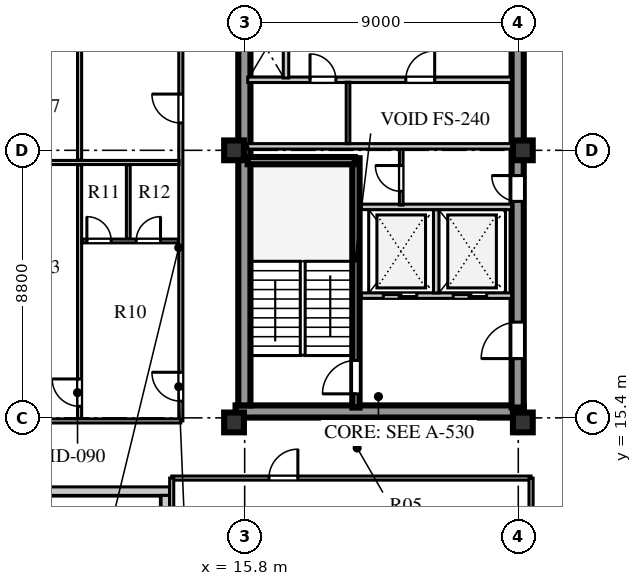
"""IFC4 building model, lengths in metres.
Left out: names, types, materials, properties, quantities, classifications, styles, units other than length and angle.
Written with IfcOpenShell. Run it as: python <this file> out.ifc"""

import sys

from ifc_helpers import new_model, si_unit, direction, frame, frame_2d, origin, origin_2d, place, context, subcontext, project, spatial, rectangle, extrude, element, fill, save


model = new_model("IFC4")
c1 = context("Model", 3, precision=1e-05, world=origin(), true_north=direction((0.0, 1.0)))
c2 = subcontext(c1, "Body", "Model", "MODEL_VIEW")
j1 = project(units=[si_unit("LENGTHUNIT", "METRE"), si_unit("PLANEANGLEUNIT", "RADIAN")], contexts=[c1])
p1 = place(None, origin())
s1 = spatial("IfcSite", under=j1, at=p1, CompositionType="ELEMENT")
p2 = place(p1, origin())
s2 = spatial("IfcBuilding", under=s1, at=p2, CompositionType="ELEMENT")
p3 = place(p2, frame((0.0, 0.0, 229.7)))
s3 = spatial("IfcBuildingStorey", under=s2, at=p3, CompositionType="ELEMENT", Elevation=229.7)
p4 = place(p3, frame((15.5, 15.61, 0.0), z_axis=(0.0, 0.0, 1.0), x_axis=(1.0, 0.0, 0.0)))
e1 = element("IfcWall", 1, at=p4, inside=s3, PredefinedType="SHEAR", context=c2, shape_type="SweptSolid", body=[
    extrude(rectangle(XDim=9.48, YDim=0.4, at=frame_2d((4.74, 0.0))), origin(), (0.0, 0.0, 1.0), 3.66),
])
p5 = place(p3, frame((15.79, 15.81, 0.0), z_axis=(0.0, 0.0, 1.0), x_axis=(0.0, 1.0, 0.0)))
e2 = element("IfcWall", 2, at=p5, inside=s3, PredefinedType="SHEAR", context=c2, shape_type="SweptSolid", body=[
    extrude(rectangle(XDim=25.63, YDim=0.4, at=frame_2d((12.815, 0.0))), origin(), (0.0, 0.0, 1.0), 3.66),
])
p6 = place(p3, frame((24.78, 15.74, 0.0), z_axis=(0.0, 0.0, 1.0), x_axis=(0.0, 1.0, 0.0)))
e3 = element("IfcWall", 3, at=p6, inside=s3, PredefinedType="SHEAR", context=c2, shape_type="SweptSolid", body=[
    extrude(rectangle(XDim=25.76, YDim=0.4, at=frame_2d((12.88, 0.0))), origin(), (0.0, 0.0, 1.0), 3.66),
])
p7 = place(p6, frame((1.61, 0.0, 0.0)))
e4 = element("IfcOpeningElement", 4, at=p7, cuts=e3, PredefinedType="OPENING", context=c2, shape_type="SweptSolid", body=[
    extrude(rectangle(XDim=1.2, YDim=2.1, at=frame_2d((0.6, 1.05))), frame((0.0, 0.21, 0.0), z_axis=(0.0, -1.0, 0.0), x_axis=(1.0, 0.0, 0.0)), (0.0, 0.0, 1.0), 0.42),
])
p8 = place(p6, frame((6.78, 0.0, 0.0)))
e5 = element("IfcOpeningElement", 5, at=p8, cuts=e3, PredefinedType="OPENING", context=c2, shape_type="SweptSolid", body=[
    extrude(rectangle(XDim=0.85, YDim=2.06, at=frame_2d((0.425, 1.03))), frame((0.0, 0.21, 0.0), z_axis=(0.0, -1.0, 0.0), x_axis=(1.0, 0.0, 0.0)), (0.0, 0.0, 1.0), 0.42),
])
p9 = place(p6, frame((12.11, 0.0, 0.0)))
e6 = element("IfcOpeningElement", 6, at=p9, cuts=e3, PredefinedType="OPENING", context=c2, shape_type="SweptSolid", body=[
    extrude(rectangle(XDim=1.5, YDim=2.12, at=frame_2d((0.75, 1.06))), frame((0.0, 0.21, 0.0), z_axis=(0.0, -1.0, 0.0), x_axis=(1.0, 0.0, 0.0)), (0.0, 0.0, 1.0), 0.42),
])
p10 = place(p6, frame((20.11, 0.0, 0.0)))
e7 = element("IfcOpeningElement", 7, at=p10, cuts=e3, PredefinedType="OPENING", context=c2, shape_type="SweptSolid", body=[
    extrude(rectangle(XDim=1.2, YDim=2.12, at=frame_2d((0.6, 1.06))), frame((0.0, 0.21, 0.0), z_axis=(0.0, -1.0, 0.0), x_axis=(1.0, 0.0, 0.0)), (0.0, 0.0, 1.0), 0.42),
])
p11 = place(p6, frame((24.01, 0.0, 0.0)))
e8 = element("IfcOpeningElement", 8, at=p11, cuts=e3, PredefinedType="OPENING", context=c2, shape_type="SweptSolid", body=[
    extrude(rectangle(XDim=0.95, YDim=2.1, at=frame_2d((0.475, 1.05))), frame((0.0, 0.21, 0.0), z_axis=(0.0, -1.0, 0.0), x_axis=(1.0, 0.0, 0.0)), (0.0, 0.0, 1.0), 0.42),
])
for number, where, z_axis, x_axis in (
    (9, (15.45, 15.25, 0.0), (0.0, 0.0, 1.0), (1.0, 0.0, 0.0)),
    (10, (15.45, 24.2, 0.0), (0.0, 0.0, 1.0), (1.0, 0.0, 0.0)),
    (11, (24.95, 15.25, 0.0), (0.0, 0.0, 1.0), (1.0, 0.0, 0.0)),
    (12, (24.95, 24.2, 0.0), (0.0, 0.0, 1.0), (1.0, 0.0, 0.0)),
):
    element("IfcColumn", number, at=place(p3, frame(where, z_axis=z_axis, x_axis=x_axis)), inside=s3, PredefinedType="COLUMN", context=c2, shape_type="SweptSolid", body=[
        extrude(rectangle(XDim=0.65, YDim=0.65, at=origin_2d()), origin(), (0.0, 0.0, 1.0), 3.66),
    ])
p12 = place(p3, frame((7.8, 12.99, 0.0), z_axis=(0.0, 0.0, 1.0), x_axis=(1.0, 0.0, 0.0)))
e13 = element("IfcWall", 13, at=p12, inside=s3, PredefinedType="STANDARD", context=c2, shape_type="SweptSolid", body=[
    extrude(rectangle(XDim=5.53, YDim=0.28, at=frame_2d((2.765, 0.0))), origin(), (0.0, 0.0, 1.0), 3.66),
])
p13 = place(p3, frame((13.19, 12.85, 0.0), z_axis=(0.0, 0.0, 1.0), x_axis=(0.0, -1.0, 0.0)))
e14 = element("IfcWall", 14, at=p13, inside=s3, PredefinedType="STANDARD", context=c2, shape_type="SweptSolid", body=[
    extrude(rectangle(XDim=4.97, YDim=0.28, at=frame_2d((2.485, 0.0))), origin(), (0.0, 0.0, 1.0), 3.66),
])
p14 = place(p3, frame((19.46, 15.74, 0.0), z_axis=(0.0, 0.0, 1.0), x_axis=(0.0, 1.0, 0.0)))
e15 = element("IfcWall", 15, at=p14, inside=s3, PredefinedType="SHEAR", context=c2, shape_type="SweptSolid", body=[
    extrude(rectangle(XDim=8.2, YDim=0.24, at=frame_2d((4.1, 0.0))), origin(), (0.0, 0.0, 1.0), 3.9),
])
p15 = place(p14, frame((0.45, 0.0, 0.0)))
e16 = element("IfcOpeningElement", 16, at=p15, cuts=e15, PredefinedType="OPENING", context=c2, shape_type="SweptSolid", body=[
    extrude(rectangle(XDim=1.1, YDim=2.1, at=frame_2d((0.55, 1.05))), frame((0.0, 0.13, 0.0), z_axis=(0.0, -1.0, 0.0), x_axis=(1.0, 0.0, 0.0)), (0.0, 0.0, 1.0), 0.26),
])
p16 = place(p3, frame((15.9, 23.86, 0.0), z_axis=(0.0, 0.0, 1.0), x_axis=(1.0, 0.0, 0.0)))
e17 = element("IfcWall", 17, at=p16, inside=s3, PredefinedType="SHEAR", context=c2, shape_type="SweptSolid", body=[
    extrude(rectangle(XDim=3.52, YDim=0.24, at=frame_2d((1.76, 0.0))), origin(), (0.0, 0.0, 1.0), 3.9),
])
p17 = place(p3, frame((19.64, 19.42, 0.0), z_axis=(0.0, 0.0, 1.0), x_axis=(1.0, 0.0, 0.0)))
e18 = element("IfcWall", 18, at=p17, inside=s3, PredefinedType="SOLIDWALL", context=c2, shape_type="SweptSolid", body=[
    extrude(rectangle(XDim=4.94, YDim=0.18, at=frame_2d((2.47, 0.0))), origin(), (0.0, 0.0, 1.0), 3.66),
])
p18 = place(p17, frame((0.72, 0.0, 0.0)))
e19 = element("IfcOpeningElement", 19, at=p18, cuts=e18, PredefinedType="OPENING", context=c2, shape_type="SweptSolid", body=[
    extrude(rectangle(XDim=1.1, YDim=2.1, at=frame_2d((0.55, 1.05))), frame((0.0, 0.1, 0.0), z_axis=(0.0, -1.0, 0.0), x_axis=(1.0, 0.0, 0.0)), (0.0, 0.0, 1.0), 0.2),
])
p19 = place(p17, frame((3.02, 0.0, 0.0)))
e20 = element("IfcOpeningElement", 20, at=p19, cuts=e18, PredefinedType="OPENING", context=c2, shape_type="SweptSolid", body=[
    extrude(rectangle(XDim=1.1, YDim=2.1, at=frame_2d((0.55, 1.05))), frame((0.0, 0.1, 0.0), z_axis=(0.0, -1.0, 0.0), x_axis=(1.0, 0.0, 0.0)), (0.0, 0.0, 1.0), 0.2),
])
p20 = place(p3, frame((22.1, 19.51, 0.0), z_axis=(0.0, 0.0, 1.0), x_axis=(0.0, 1.0, 0.0)))
e21 = element("IfcWall", 21, at=p20, inside=s3, PredefinedType="SOLIDWALL", context=c2, shape_type="SweptSolid", body=[
    extrude(rectangle(XDim=2.74, YDim=0.18, at=frame_2d((1.37, 0.0))), origin(), (0.0, 0.0, 1.0), 3.66),
])
p21 = place(p3, frame((19.64, 22.34, 0.0), z_axis=(0.0, 0.0, 1.0), x_axis=(1.0, 0.0, 0.0)))
e22 = element("IfcWall", 22, at=p21, inside=s3, PredefinedType="SOLIDWALL", context=c2, shape_type="SweptSolid", body=[
    extrude(rectangle(XDim=4.94, YDim=0.18, at=frame_2d((2.47, 0.0))), origin(), (0.0, 0.0, 1.0), 3.66),
])
p22 = place(p3, frame((20.95, 22.4, 0.0), z_axis=(0.0, 0.0, 1.0), x_axis=(0.0, 1.0, 0.0)))
e23 = element("IfcWall", 23, at=p22, inside=s3, PredefinedType="PARTITIONING", context=c2, shape_type="SweptSolid", body=[
    extrude(rectangle(XDim=1.88, YDim=0.12, at=frame_2d((0.94, 0.0))), origin(), (0.0, 0.0, 1.0), 3.66),
])
p23 = place(p22, frame((0.45, 0.0, 0.0)))
e24 = element("IfcOpeningElement", 24, at=p23, cuts=e23, PredefinedType="OPENING", context=c2, shape_type="SweptSolid", body=[
    extrude(rectangle(XDim=0.85, YDim=2.06, at=frame_2d((0.425, 1.03))), frame((0.0, 0.07, 0.0), z_axis=(0.0, -1.0, 0.0), x_axis=(1.0, 0.0, 0.0)), (0.0, 0.0, 1.0), 0.14),
])
p24 = place(p3, frame((15.9, 26.52, 0.0), z_axis=(0.0, 0.0, 1.0), x_axis=(1.0, 0.0, 0.0)))
e25 = element("IfcWall", 25, at=p24, inside=s3, PredefinedType="SOLIDWALL", context=c2, shape_type="SweptSolid", body=[
    extrude(rectangle(XDim=8.68, YDim=0.18, at=frame_2d((4.34, 0.0))), origin(), (0.0, 0.0, 1.0), 3.66),
])
p25 = place(p24, frame((2.05, 0.0, 0.0)))
e26 = element("IfcOpeningElement", 26, at=p25, cuts=e25, PredefinedType="OPENING", context=c2, shape_type="SweptSolid", body=[
    extrude(rectangle(XDim=0.85, YDim=2.06, at=frame_2d((0.425, 1.03))), frame((0.0, 0.1, 0.0), z_axis=(0.0, -1.0, 0.0), x_axis=(1.0, 0.0, 0.0)), (0.0, 0.0, 1.0), 0.2),
])
p26 = place(p24, frame((5.2, 0.0, 0.0)))
e27 = element("IfcOpeningElement", 27, at=p26, cuts=e25, PredefinedType="OPENING", context=c2, shape_type="SweptSolid", body=[
    extrude(rectangle(XDim=0.95, YDim=2.1, at=frame_2d((0.475, 1.05))), frame((0.0, 0.1, 0.0), z_axis=(0.0, -1.0, 0.0), x_axis=(1.0, 0.0, 0.0)), (0.0, 0.0, 1.0), 0.2),
])
p27 = place(p3, frame((15.9, 24.33, 0.0), z_axis=(0.0, 0.0, 1.0), x_axis=(1.0, 0.0, 0.0)))
e28 = element("IfcWall", 28, at=p27, inside=s3, PredefinedType="SOLIDWALL", context=c2, shape_type="SweptSolid", body=[
    extrude(rectangle(XDim=8.68, YDim=0.18, at=frame_2d((4.34, 0.0))), origin(), (0.0, 0.0, 1.0), 3.06),
])
p28 = place(p3, frame((19.2, 24.42, 0.0), z_axis=(0.0, 0.0, 1.0), x_axis=(0.0, 1.0, 0.0)))
e29 = element("IfcWall", 29, at=p28, inside=s3, PredefinedType="PARTITIONING", context=c2, shape_type="SweptSolid", body=[
    extrude(rectangle(XDim=2.02, YDim=0.12, at=frame_2d((1.01, 0.0))), origin(), (0.0, 0.0, 1.0), 3.66),
])
p29 = place(p3, frame((17.16, 26.58, 0.0), z_axis=(0.0, 0.0, 1.0), x_axis=(0.0, 1.0, 0.0)))
e30 = element("IfcWall", 30, at=p29, inside=s3, PredefinedType="SOLIDWALL", context=c2, shape_type="SweptSolid", body=[
    extrude(rectangle(XDim=4.02, YDim=0.18, at=frame_2d((2.01, 0.0))), origin(), (0.0, 0.0, 1.0), 3.66),
])
p30 = place(p29, frame((2.35, 0.0, 0.0)))
e31 = element("IfcOpeningElement", 31, at=p30, cuts=e30, PredefinedType="OPENING", context=c2, shape_type="SweptSolid", body=[
    extrude(rectangle(XDim=0.85, YDim=2.06, at=frame_2d((0.425, 1.03))), frame((0.0, 0.1, 0.0), z_axis=(0.0, -1.0, 0.0), x_axis=(1.0, 0.0, 0.0)), (0.0, 0.0, 1.0), 0.2),
])
p31 = place(p3, frame((13.4, 13.42, 0.0), z_axis=(0.0, 0.0, 1.0), x_axis=(1.0, 0.0, 0.0)))
e32 = element("IfcWall", 32, at=p31, inside=s3, PredefinedType="PARTITIONING", context=c2, shape_type="SweptSolid", body=[
    extrude(rectangle(XDim=11.82, YDim=0.135, at=frame_2d((5.91, 0.0))), origin(), (0.0, 0.0, 1.0), 3.66),
])
p32 = place(p31, frame((3.2, 0.0, 0.0)))
e33 = element("IfcOpeningElement", 33, at=p32, cuts=e32, PredefinedType="OPENING", context=c2, shape_type="SweptSolid", body=[
    extrude(rectangle(XDim=0.95, YDim=2.08, at=frame_2d((0.475, 1.04))), frame((0.0, 0.078, 0.0), z_axis=(0.0, -1.0, 0.0), x_axis=(1.0, 0.0, 0.0)), (0.0, 0.0, 1.0), 0.155),
])
p33 = place(p3, frame((13.4, 7.88, 0.0), z_axis=(0.0, 0.0, 1.0), x_axis=(0.0, 1.0, 0.0)))
e34 = element("IfcWall", 34, at=p33, inside=s3, PredefinedType="PARTITIONING", context=c2, shape_type="SweptSolid", body=[
    extrude(rectangle(XDim=5.54, YDim=0.135, at=frame_2d((2.77, 0.0))), origin(), (0.0, 0.0, 1.0), 3.66),
])
p34 = place(p3, frame((25.22, 7.88, 0.0), z_axis=(0.0, 0.0, 1.0), x_axis=(0.0, 1.0, 0.0)))
e35 = element("IfcWall", 35, at=p34, inside=s3, PredefinedType="PARTITIONING", context=c2, shape_type="SweptSolid", body=[
    extrude(rectangle(XDim=5.54, YDim=0.135, at=frame_2d((2.77, 0.0))), origin(), (0.0, 0.0, 1.0), 3.21),
])
p35 = place(p3, frame((13.7, 15.3, 0.0), z_axis=(0.0, 0.0, 1.0), x_axis=(0.0, 1.0, 0.0)))
e36 = element("IfcWall", 36, at=p35, inside=s3, PredefinedType="PARTITIONING", context=c2, shape_type="SweptSolid", body=[
    extrude(rectangle(XDim=26.6, YDim=0.135, at=frame_2d((13.3, 0.0))), origin(), (0.0, 0.0, 1.0), 3.66),
])
p36 = place(p35, frame((0.65, 0.0, 0.0)))
e37 = element("IfcOpeningElement", 37, at=p36, cuts=e36, PredefinedType="OPENING", context=c2, shape_type="SweptSolid", body=[
    extrude(rectangle(XDim=0.95, YDim=2.1, at=frame_2d((0.475, 1.05))), frame((0.0, 0.078, 0.0), z_axis=(0.0, -1.0, 0.0), x_axis=(1.0, 0.0, 0.0)), (0.0, 0.0, 1.0), 0.155),
])
p37 = place(p35, frame((9.8, 0.0, 0.0)))
e38 = element("IfcOpeningElement", 38, at=p37, cuts=e36, PredefinedType="OPENING", context=c2, shape_type="SweptSolid", body=[
    extrude(rectangle(XDim=0.95, YDim=2.1, at=frame_2d((0.475, 1.05))), frame((0.0, 0.078, 0.0), z_axis=(0.0, -1.0, 0.0), x_axis=(1.0, 0.0, 0.0)), (0.0, 0.0, 1.0), 0.155),
])
p38 = place(p35, frame((18.75, 0.0, 0.0)))
e39 = element("IfcOpeningElement", 39, at=p38, cuts=e36, PredefinedType="OPENING", context=c2, shape_type="SweptSolid", body=[
    extrude(rectangle(XDim=0.95, YDim=2.1, at=frame_2d((0.475, 1.05))), frame((0.0, 0.078, 0.0), z_axis=(0.0, -1.0, 0.0), x_axis=(1.0, 0.0, 0.0)), (0.0, 0.0, 1.0), 0.155),
])
p39 = place(p3, frame((8.08, 15.3, 0.0), z_axis=(0.0, 0.0, 1.0), x_axis=(1.0, 0.0, 0.0)))
e40 = element("IfcWall", 40, at=p39, inside=s3, PredefinedType="PARTITIONING", context=c2, shape_type="SweptSolid", body=[
    extrude(rectangle(XDim=5.62, YDim=0.135, at=frame_2d((2.81, 0.0))), origin(), (0.0, 0.0, 1.0), 3.21),
])
p40 = place(p3, frame((10.37, 15.38, 0.0), z_axis=(0.0, 0.0, 1.0), x_axis=(0.0, 1.0, 0.0)))
e41 = element("IfcWall", 41, at=p40, inside=s3, PredefinedType="PARTITIONING", context=c2, shape_type="SweptSolid", body=[
    extrude(rectangle(XDim=8.34, YDim=0.135, at=frame_2d((4.17, 0.0))), origin(), (0.0, 0.0, 1.0), 3.66),
])
p41 = place(p40, frame((0.4, 0.0, 0.0)))
e42 = element("IfcOpeningElement", 42, at=p41, cuts=e41, PredefinedType="OPENING", context=c2, shape_type="SweptSolid", body=[
    extrude(rectangle(XDim=0.9, YDim=2.08, at=frame_2d((0.45, 1.04))), frame((0.0, 0.078, 0.0), z_axis=(0.0, -1.0, 0.0), x_axis=(1.0, 0.0, 0.0)), (0.0, 0.0, 1.0), 0.155),
])
p42 = place(p3, frame((10.45, 21.218, 0.0), z_axis=(0.0, 0.0, 1.0), x_axis=(1.0, 0.0, 0.0)))
e43 = element("IfcWall", 43, at=p42, inside=s3, PredefinedType="PLUMBINGWALL", context=c2, shape_type="SweptSolid", body=[
    extrude(rectangle(XDim=3.17, YDim=0.125, at=frame_2d((1.585, 0.0))), origin(), (0.0, 0.0, 1.0), 3.66),
])
p43 = place(p42, frame((0.16, 0.0, 0.0)))
e44 = element("IfcOpeningElement", 44, at=p43, cuts=e43, PredefinedType="OPENING", context=c2, shape_type="SweptSolid", body=[
    extrude(rectangle(XDim=0.8, YDim=2.05, at=frame_2d((0.4, 1.025))), frame((0.0, 0.073, 0.0), z_axis=(0.0, -1.0, 0.0), x_axis=(1.0, 0.0, 0.0)), (0.0, 0.0, 1.0), 0.145),
])
p44 = place(p42, frame((1.782, 0.0, 0.0)))
e45 = element("IfcOpeningElement", 45, at=p44, cuts=e43, PredefinedType="OPENING", context=c2, shape_type="SweptSolid", body=[
    extrude(rectangle(XDim=0.8, YDim=2.05, at=frame_2d((0.4, 1.025))), frame((0.0, 0.073, 0.0), z_axis=(0.0, -1.0, 0.0), x_axis=(1.0, 0.0, 0.0)), (0.0, 0.0, 1.0), 0.145),
])
p45 = place(p3, frame((11.972, 21.298, 0.0), z_axis=(0.0, 0.0, 1.0), x_axis=(0.0, 1.0, 0.0)))
e46 = element("IfcWall", 46, at=p45, inside=s3, PredefinedType="PLUMBINGWALL", context=c2, shape_type="SweptSolid", body=[
    extrude(rectangle(XDim=2.422, YDim=0.125, at=frame_2d((1.211, 0.0))), origin(), (0.0, 0.0, 1.0), 3.66),
])
p46 = place(p3, frame((8.08, 23.8, 0.0), z_axis=(0.0, 0.0, 1.0), x_axis=(1.0, 0.0, 0.0)))
e47 = element("IfcWall", 47, at=p46, inside=s3, PredefinedType="PARTITIONING", context=c2, shape_type="SweptSolid", body=[
    extrude(rectangle(XDim=5.56, YDim=0.135, at=frame_2d((2.78, 0.0))), origin(), (0.0, 0.0, 1.0), 3.66),
])
p47 = place(p3, frame((10.37, 23.88, 0.0), z_axis=(0.0, 0.0, 1.0), x_axis=(0.0, 1.0, 0.0)))
e48 = element("IfcWall", 48, at=p47, inside=s3, PredefinedType="PARTITIONING", context=c2, shape_type="SweptSolid", body=[
    extrude(rectangle(XDim=9.44, YDim=0.135, at=frame_2d((4.72, 0.0))), origin(), (0.0, 0.0, 1.0), 3.66),
])
p48 = place(p47, frame((3.67, 0.0, 0.0)))
e49 = element("IfcOpeningElement", 49, at=p48, cuts=e48, PredefinedType="OPENING", context=c2, shape_type="SweptSolid", body=[
    extrude(rectangle(XDim=0.85, YDim=2.08, at=frame_2d((0.425, 1.04))), frame((0.0, 0.078, 0.0), z_axis=(0.0, -1.0, 0.0), x_axis=(1.0, 0.0, 0.0)), (0.0, 0.0, 1.0), 0.155),
])
p49 = place(p47, frame((4.97, 0.0, 0.0)))
e50 = element("IfcOpeningElement", 50, at=p49, cuts=e48, PredefinedType="OPENING", context=c2, shape_type="SweptSolid", body=[
    extrude(rectangle(XDim=0.85, YDim=2.08, at=frame_2d((0.425, 1.04))), frame((0.0, 0.078, 0.0), z_axis=(0.0, -1.0, 0.0), x_axis=(1.0, 0.0, 0.0)), (0.0, 0.0, 1.0), 0.155),
])
p50 = place(p15, origin())
e51 = element("IfcDoor", 51, at=p50, inside=s3, OperationType="SINGLE_SWING_LEFT", PredefinedType="DOOR", context=c2, shape_type="SweptSolid", body=[
    extrude(rectangle(XDim=1.1, YDim=2.1, at=frame_2d((0.55, 1.05))), frame((0.0, 0.025, 0.0), z_axis=(0.0, -1.0, 0.0), x_axis=(1.0, 0.0, 0.0)), (0.0, 0.0, 1.0), 0.05),
])
fill(e16, e51)
p51 = place(p18, origin())
e52 = element("IfcDoor", 52, at=p51, inside=s3, OperationType="DOUBLE_DOOR_SLIDING", PredefinedType="DOOR", context=c2, shape_type="SweptSolid", body=[
    extrude(rectangle(XDim=1.1, YDim=2.1, at=frame_2d((0.55, 1.05))), frame((0.0, 0.025, 0.0), z_axis=(0.0, -1.0, 0.0), x_axis=(1.0, 0.0, 0.0)), (0.0, 0.0, 1.0), 0.05),
])
fill(e19, e52)
p52 = place(p19, origin())
e53 = element("IfcDoor", 53, at=p52, inside=s3, OperationType="DOUBLE_DOOR_SLIDING", PredefinedType="DOOR", context=c2, shape_type="SweptSolid", body=[
    extrude(rectangle(XDim=1.1, YDim=2.1, at=frame_2d((0.55, 1.05))), frame((0.0, 0.025, 0.0), z_axis=(0.0, -1.0, 0.0), x_axis=(1.0, 0.0, 0.0)), (0.0, 0.0, 1.0), 0.05),
])
fill(e20, e53)
p53 = place(p7, frame((1.2, 0.0, 0.0), z_axis=(0.0, 0.0, 1.0), x_axis=(-1.0, 0.0, 0.0)))
e54 = element("IfcDoor", 54, at=p53, inside=s3, OperationType="SINGLE_SWING_RIGHT", PredefinedType="DOOR", context=c2, shape_type="SweptSolid", body=[
    extrude(rectangle(XDim=1.2, YDim=2.1, at=frame_2d((0.6, 1.05))), frame((0.0, 0.025, 0.0), z_axis=(0.0, -1.0, 0.0), x_axis=(1.0, 0.0, 0.0)), (0.0, 0.0, 1.0), 0.05),
])
fill(e4, e54)
p54 = place(p23, origin())
e55 = element("IfcDoor", 55, at=p54, inside=s3, OperationType="SINGLE_SWING_RIGHT", PredefinedType="DOOR", context=c2, shape_type="SweptSolid", body=[
    extrude(rectangle(XDim=0.85, YDim=2.06, at=frame_2d((0.425, 1.03))), frame((0.0, 0.025, 0.0), z_axis=(0.0, -1.0, 0.0), x_axis=(1.0, 0.0, 0.0)), (0.0, 0.0, 1.0), 0.05),
])
fill(e24, e55)
p55 = place(p8, frame((0.85, 0.0, 0.0), z_axis=(0.0, 0.0, 1.0), x_axis=(-1.0, 0.0, 0.0)))
e56 = element("IfcDoor", 56, at=p55, inside=s3, OperationType="SINGLE_SWING_LEFT", PredefinedType="DOOR", context=c2, shape_type="SweptSolid", body=[
    extrude(rectangle(XDim=0.85, YDim=2.06, at=frame_2d((0.425, 1.03))), frame((0.0, 0.025, 0.0), z_axis=(0.0, -1.0, 0.0), x_axis=(1.0, 0.0, 0.0)), (0.0, 0.0, 1.0), 0.05),
])
fill(e5, e56)
p56 = place(p25, origin())
e57 = element("IfcDoor", 57, at=p56, inside=s3, OperationType="SINGLE_SWING_LEFT", PredefinedType="DOOR", context=c2, shape_type="SweptSolid", body=[
    extrude(rectangle(XDim=0.85, YDim=2.06, at=frame_2d((0.425, 1.03))), frame((0.0, 0.025, 0.0), z_axis=(0.0, -1.0, 0.0), x_axis=(1.0, 0.0, 0.0)), (0.0, 0.0, 1.0), 0.05),
])
fill(e26, e57)
p57 = place(p26, origin())
e58 = element("IfcDoor", 58, at=p57, inside=s3, OperationType="SINGLE_SWING_RIGHT", PredefinedType="DOOR", context=c2, shape_type="SweptSolid", body=[
    extrude(rectangle(XDim=0.95, YDim=2.1, at=frame_2d((0.475, 1.05))), frame((0.0, 0.025, 0.0), z_axis=(0.0, -1.0, 0.0), x_axis=(1.0, 0.0, 0.0)), (0.0, 0.0, 1.0), 0.05),
])
fill(e27, e58)
p58 = place(p32, frame((0.95, 0.0, 0.0), z_axis=(0.0, 0.0, 1.0), x_axis=(-1.0, 0.0, 0.0)))
e59 = element("IfcDoor", 59, at=p58, inside=s3, OperationType="SINGLE_SWING_LEFT", PredefinedType="DOOR", context=c2, shape_type="SweptSolid", body=[
    extrude(rectangle(XDim=0.95, YDim=2.08, at=frame_2d((0.475, 1.04))), frame((0.0, 0.025, 0.0), z_axis=(0.0, -1.0, 0.0), x_axis=(1.0, 0.0, 0.0)), (0.0, 0.0, 1.0), 0.05),
])
fill(e33, e59)
p59 = place(p43, origin())
e60 = element("IfcDoor", 60, at=p59, inside=s3, OperationType="SINGLE_SWING_LEFT", PredefinedType="DOOR", context=c2, shape_type="SweptSolid", body=[
    extrude(rectangle(XDim=0.8, YDim=2.05, at=frame_2d((0.4, 1.025))), frame((0.0, 0.025, 0.0), z_axis=(0.0, -1.0, 0.0), x_axis=(1.0, 0.0, 0.0)), (0.0, 0.0, 1.0), 0.05),
])
fill(e44, e60)
p60 = place(p44, origin())
e61 = element("IfcDoor", 61, at=p60, inside=s3, OperationType="SINGLE_SWING_RIGHT", PredefinedType="DOOR", context=c2, shape_type="SweptSolid", body=[
    extrude(rectangle(XDim=0.8, YDim=2.05, at=frame_2d((0.4, 1.025))), frame((0.0, 0.025, 0.0), z_axis=(0.0, -1.0, 0.0), x_axis=(1.0, 0.0, 0.0)), (0.0, 0.0, 1.0), 0.05),
])
fill(e45, e61)
p61 = place(p41, frame((0.9, 0.0, 0.0), z_axis=(0.0, 0.0, 1.0), x_axis=(-1.0, 0.0, 0.0)))
e62 = element("IfcDoor", 62, at=p61, inside=s3, OperationType="SINGLE_SWING_LEFT", PredefinedType="DOOR", context=c2, shape_type="SweptSolid", body=[
    extrude(rectangle(XDim=0.9, YDim=2.08, at=frame_2d((0.45, 1.04))), frame((0.0, 0.025, 0.0), z_axis=(0.0, -1.0, 0.0), x_axis=(1.0, 0.0, 0.0)), (0.0, 0.0, 1.0), 0.05),
])
fill(e42, e62)
p62 = place(p36, frame((0.95, 0.0, 0.0), z_axis=(0.0, 0.0, 1.0), x_axis=(-1.0, 0.0, 0.0)))
e63 = element("IfcDoor", 63, at=p62, inside=s3, OperationType="SINGLE_SWING_LEFT", PredefinedType="DOOR", context=c2, shape_type="SweptSolid", body=[
    extrude(rectangle(XDim=0.95, YDim=2.1, at=frame_2d((0.475, 1.05))), frame((0.0, 0.025, 0.0), z_axis=(0.0, -1.0, 0.0), x_axis=(1.0, 0.0, 0.0)), (0.0, 0.0, 1.0), 0.05),
])
fill(e37, e63)
p63 = place(p37, frame((0.95, 0.0, 0.0), z_axis=(0.0, 0.0, 1.0), x_axis=(-1.0, 0.0, 0.0)))
e64 = element("IfcDoor", 64, at=p63, inside=s3, OperationType="SINGLE_SWING_LEFT", PredefinedType="DOOR", context=c2, shape_type="SweptSolid", body=[
    extrude(rectangle(XDim=0.95, YDim=2.1, at=frame_2d((0.475, 1.05))), frame((0.0, 0.025, 0.0), z_axis=(0.0, -1.0, 0.0), x_axis=(1.0, 0.0, 0.0)), (0.0, 0.0, 1.0), 0.05),
])
fill(e38, e64)
save(model, sys.argv[1])
